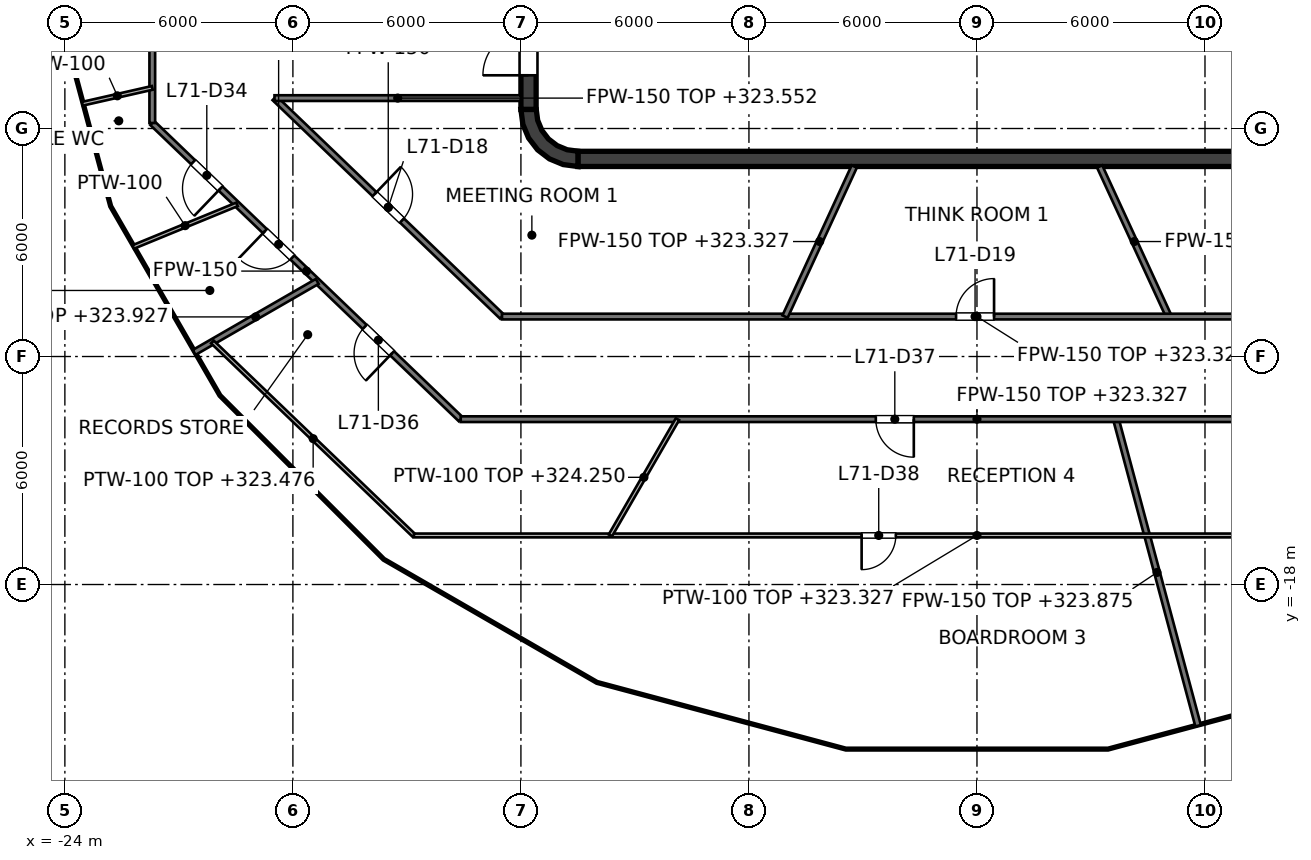
"""IFC4 building model, lengths in metres.
Left out: names, types, materials, properties, quantities, classifications, styles, units other than length and angle.
Written with IfcOpenShell. Run it as: python <this file> out.ifc"""

import sys

from ifc_helpers import new_model, si_unit, direction, frame, frame_2d, origin, place, context, subcontext, project, spatial, polyline, rectangle, outline, extrude, element, fill, save


model = new_model("IFC4")
c1 = context("Model", 3, precision=1e-05, world=origin(), true_north=direction((0.0, 1.0)))
c2 = subcontext(c1, "Body", "Model", "MODEL_VIEW")
j1 = project(units=[si_unit("LENGTHUNIT", "METRE"), si_unit("PLANEANGLEUNIT", "RADIAN")], contexts=[c1])
p1 = place(None, origin())
s1 = spatial("IfcSite", under=j1, at=p1, CompositionType="ELEMENT")
p2 = place(p1, origin())
s2 = spatial("IfcBuilding", under=s1, at=p2, CompositionType="ELEMENT")
p3 = place(p2, frame((0.0, 0.0, 320.4)))
s3 = spatial("IfcBuildingStorey", under=s2, at=p3, CompositionType="ELEMENT", Elevation=320.4)
p4 = place(p3, frame((-10.5, -6.8, 0.0), z_axis=(0.0, 0.0, 1.0), x_axis=(1.0, 0.0, 0.0)))
e1 = element("IfcWall", 1, at=p4, inside=s3, PredefinedType="SHEAR", context=c2, shape_type="SweptSolid", body=[
    extrude(rectangle(XDim=21.0, YDim=0.4, at=frame_2d((10.5, 0.0))), origin(), (0.0, 0.0, 1.0), 4.0),
])
p5 = place(p3, frame((-11.8, -5.5, 0.0), z_axis=(0.0, 0.0, 1.0), x_axis=(0.0, 1.0, 0.0)))
e2 = element("IfcWall", 2, at=p5, inside=s3, PredefinedType="SHEAR", context=c2, shape_type="SweptSolid", body=[
    extrude(rectangle(XDim=11.0, YDim=0.4, at=frame_2d((5.5, 0.0))), origin(), (0.0, 0.0, 1.0), 4.0),
])
p6 = place(p5, frame((3.2, 0.0, 0.0)))
e3 = element("IfcOpeningElement", 3, at=p6, cuts=e2, PredefinedType="OPENING", context=c2, shape_type="SweptSolid", body=[
    extrude(rectangle(XDim=1.0, YDim=2.1, at=frame_2d((0.5, 1.05))), frame((0.0, 0.2, 0.0), z_axis=(0.0, -1.0, 0.0), x_axis=(1.0, 0.0, 0.0)), (0.0, 0.0, 1.0), 0.4),
])
p7 = place(p5, frame((6.1, 0.0, 0.0)))
e4 = element("IfcOpeningElement", 4, at=p7, cuts=e2, PredefinedType="OPENING", context=c2, shape_type="SweptSolid", body=[
    extrude(rectangle(XDim=1.0, YDim=2.1, at=frame_2d((0.5, 1.05))), frame((0.0, 0.2, 0.0), z_axis=(0.0, -1.0, 0.0), x_axis=(1.0, 0.0, 0.0)), (0.0, 0.0, 1.0), 0.4),
])
p8 = place(p5, frame((0.9, 0.0, 0.0)))
e5 = element("IfcOpeningElement", 5, at=p8, cuts=e2, PredefinedType="OPENING", context=c2, shape_type="SweptSolid", body=[
    extrude(rectangle(XDim=1.2, YDim=2.1, at=frame_2d((0.6, 1.05))), frame((0.0, 0.2, 0.0), z_axis=(0.0, -1.0, 0.0), x_axis=(1.0, 0.0, 0.0)), (0.0, 0.0, 1.0), 0.4),
])
p9 = place(p5, frame((8.9, 0.0, 0.0)))
e6 = element("IfcOpeningElement", 6, at=p9, cuts=e2, PredefinedType="OPENING", context=c2, shape_type="SweptSolid", body=[
    extrude(rectangle(XDim=1.2, YDim=2.1, at=frame_2d((0.6, 1.05))), frame((0.0, 0.2, 0.0), z_axis=(0.0, -1.0, 0.0), x_axis=(1.0, 0.0, 0.0)), (0.0, 0.0, 1.0), 0.4),
])
p10 = place(p3, origin())
e7 = element("IfcWall", 7, at=p10, inside=s3, PredefinedType="SHEAR", context=c2, shape_type="SweptSolid", body=[
    extrude(outline(polyline([(-10.5, -7.0), (-10.5, -6.596), (-10.784, -6.559), (-11.048, -6.45), (-11.275, -6.275), (-11.45, -6.048), (-11.559, -5.784), (-11.596, -5.5), (-12.0, -5.5), (-11.949, -5.888), (-11.799, -6.25), (-11.561, -6.561), (-11.25, -6.799), (-10.888, -6.949), (-10.5, -7.0)])), origin(), (0.0, 0.0, 1.0), 4.0),
])
p11 = place(p3, frame((0.3, -6.6, 0.0), z_axis=(0.0, 0.0, 1.0), x_axis=(0.0, 1.0, 0.0)))
e8 = element("IfcWall", 8, at=p11, inside=s3, PredefinedType="PARTITIONING", context=c2, shape_type="SweptSolid", body=[
    extrude(rectangle(XDim=2.5, YDim=0.15, at=frame_2d((1.25, 0.0))), origin(), (0.0, 0.0, 1.0), 3.85),
])
p12 = place(p11, frame((0.8, 0.0, 0.0)))
e9 = element("IfcOpeningElement", 9, at=p12, cuts=e8, PredefinedType="OPENING", context=c2, shape_type="SweptSolid", body=[
    extrude(rectangle(XDim=0.9, YDim=2.1, at=frame_2d((0.45, 1.05))), frame((0.0, 0.075, 0.0), z_axis=(0.0, -1.0, 0.0), x_axis=(1.0, 0.0, 0.0)), (0.0, 0.0, 1.0), 0.15),
])
p13 = place(p3, frame((-9.0, -6.6, 0.0), z_axis=(0.0, 0.0, 1.0), x_axis=(0.0, 1.0, 0.0)))
e10 = element("IfcWall", 10, at=p13, inside=s3, PredefinedType="PARTITIONING", context=c2, shape_type="SweptSolid", body=[
    extrude(rectangle(XDim=2.5, YDim=0.25, at=frame_2d((1.25, 0.0))), origin(), (0.0, 0.0, 1.0), 3.85),
])
p14 = place(p13, frame((0.75, 0.0, 0.0)))
e11 = element("IfcOpeningElement", 11, at=p14, cuts=e10, PredefinedType="OPENING", context=c2, shape_type="SweptSolid", body=[
    extrude(rectangle(XDim=1.0, YDim=2.1, at=frame_2d((0.5, 1.05))), frame((0.0, 0.125, 0.0), z_axis=(0.0, -1.0, 0.0), x_axis=(1.0, 0.0, 0.0)), (0.0, 0.0, 1.0), 0.25),
])
p15 = place(p3, frame((3.15, -6.6, 0.0), z_axis=(0.0, 0.0, 1.0), x_axis=(0.0, 1.0, 0.0)))
e12 = element("IfcWall", 12, at=p15, inside=s3, PredefinedType="SOLIDWALL", context=c2, shape_type="SweptSolid", body=[
    extrude(rectangle(XDim=2.5, YDim=0.25, at=frame_2d((1.25, 0.0))), origin(), (0.0, 0.0, 1.0), 3.85),
])
p16 = place(p3, frame((-2.9, -6.6, 0.0), z_axis=(0.0, 0.0, 1.0), x_axis=(0.0, 1.0, 0.0)))
e13 = element("IfcWall", 13, at=p16, inside=s3, PredefinedType="PARTITIONING", context=c2, shape_type="SweptSolid", body=[
    extrude(rectangle(XDim=2.5, YDim=0.25, at=frame_2d((1.25, 0.0))), origin(), (0.0, 0.0, 1.0), 3.85),
])
p17 = place(p16, frame((0.8, 0.0, 0.0)))
e14 = element("IfcOpeningElement", 14, at=p17, cuts=e13, PredefinedType="OPENING", context=c2, shape_type="SweptSolid", body=[
    extrude(rectangle(XDim=0.9, YDim=2.1, at=frame_2d((0.45, 1.05))), frame((0.0, 0.125, 0.0), z_axis=(0.0, -1.0, 0.0), x_axis=(1.0, 0.0, 0.0)), (0.0, 0.0, 1.0), 0.25),
])
p18 = place(p3, frame((-9.125, -3.975, 0.0), z_axis=(0.0, 0.0, 1.0), x_axis=(1.0, 0.0, 0.0)))
e15 = element("IfcWall", 15, at=p18, inside=s3, PredefinedType="SOLIDWALL", context=c2, shape_type="SweptSolid", body=[
    extrude(rectangle(XDim=12.4, YDim=0.25, at=frame_2d((6.2, 0.0))), origin(), (0.0, 0.0, 1.0), 3.85),
])
p19 = place(p18, frame((1.05, 0.0, 0.0)))
e16 = element("IfcOpeningElement", 16, at=p19, cuts=e15, PredefinedType="OPENING", context=c2, shape_type="SweptSolid", body=[
    extrude(rectangle(XDim=1.2, YDim=2.1, at=frame_2d((0.6, 1.05))), frame((0.0, 0.125, 0.0), z_axis=(0.0, -1.0, 0.0), x_axis=(1.0, 0.0, 0.0)), (0.0, 0.0, 1.0), 0.25),
])
p20 = place(p18, frame((4.1, 0.0, 0.0)))
e17 = element("IfcOpeningElement", 17, at=p20, cuts=e15, PredefinedType="OPENING", context=c2, shape_type="SweptSolid", body=[
    extrude(rectangle(XDim=1.2, YDim=2.1, at=frame_2d((0.6, 1.05))), frame((0.0, 0.125, 0.0), z_axis=(0.0, -1.0, 0.0), x_axis=(1.0, 0.0, 0.0)), (0.0, 0.0, 1.0), 0.25),
])
p21 = place(p3, frame((3.275, -3.975, 0.0), z_axis=(0.0, 0.0, 1.0), x_axis=(1.0, 0.0, 0.0)))
e18 = element("IfcWall", 18, at=p21, inside=s3, PredefinedType="SOLIDWALL", context=c2, shape_type="SweptSolid", body=[
    extrude(rectangle(XDim=5.85, YDim=0.25, at=frame_2d((2.925, 0.0))), origin(), (0.0, 0.0, 1.0), 3.85),
])
p22 = place(p3, frame((3.657, -13.649, 0.0), z_axis=(0.0, 0.0, 1.0), x_axis=(0.258877815031, -0.965910077018, 0.0)))
e19 = element("IfcWall", 19, at=p22, inside=s3, PredefinedType="PARTITIONING", context=c2, shape_type="SweptSolid", body=[
    extrude(rectangle(XDim=8.352, YDim=0.15, at=frame_2d((4.176, 0.0))), origin(), (0.0, 0.0, 1.0), 3.475),
])
p23 = place(p3, frame((3.229, -7.0, 0.0), z_axis=(0.0, 0.0, 1.0), x_axis=(0.418762657012, -0.908095720226, 0.0)))
e20 = element("IfcWall", 20, at=p23, inside=s3, PredefinedType="PARTITIONING", context=c2, shape_type="SweptSolid", body=[
    extrude(rectangle(XDim=4.349, YDim=0.15, at=frame_2d((2.174, 0.0))), origin(), (0.0, 0.0, 1.0), 2.927),
])
p24 = place(p3, frame((-21.7, -5.855, 0.0), z_axis=(0.0, 0.0, 1.0), x_axis=(0.721260272646, -0.692664145963, 0.0)))
e21 = element("IfcWall", 21, at=p24, inside=s3, PredefinedType="PARTITIONING", context=c2, shape_type="SweptSolid", body=[
    extrude(rectangle(XDim=11.252, YDim=0.15, at=frame_2d((5.626, 0.0))), origin(), (0.0, 0.0, 1.0), 3.076),
])
p25 = place(p24, frame((1.489, 0.0, 0.0)))
e22 = element("IfcOpeningElement", 22, at=p25, cuts=e21, PredefinedType="OPENING", context=c2, shape_type="SweptSolid", body=[
    extrude(rectangle(XDim=1.0, YDim=2.1, at=frame_2d((0.5, 1.05))), frame((0.0, 0.075, 0.0), z_axis=(0.0, -1.0, 0.0), x_axis=(1.0, 0.0, 0.0)), (0.0, 0.0, 1.0), 0.15),
])
p26 = place(p24, frame((4.109, 0.0, 0.0)))
e23 = element("IfcOpeningElement", 23, at=p26, cuts=e21, PredefinedType="OPENING", context=c2, shape_type="SweptSolid", body=[
    extrude(rectangle(XDim=1.0, YDim=2.1, at=frame_2d((0.5, 1.05))), frame((0.0, 0.075, 0.0), z_axis=(0.0, -1.0, 0.0), x_axis=(1.0, 0.0, 0.0)), (0.0, 0.0, 1.0), 0.15),
])
p27 = place(p24, frame((7.748, 0.0, 0.0)))
e24 = element("IfcOpeningElement", 24, at=p27, cuts=e21, PredefinedType="OPENING", context=c2, shape_type="SweptSolid", body=[
    extrude(rectangle(XDim=1.0, YDim=2.1, at=frame_2d((0.5, 1.05))), frame((0.0, 0.075, 0.0), z_axis=(0.0, -1.0, 0.0), x_axis=(1.0, 0.0, 0.0)), (0.0, 0.0, 1.0), 0.15),
])
p28 = place(p3, frame((-18.484, -5.2, 0.0), z_axis=(0.0, 0.0, 1.0), x_axis=(0.721258572397, -0.692665916401, 0.0)))
e25 = element("IfcWall", 25, at=p28, inside=s3, PredefinedType="PARTITIONING", context=c2, shape_type="SweptSolid", body=[
    extrude(rectangle(XDim=8.3, YDim=0.15, at=frame_2d((4.15, 0.0))), origin(), (0.0, 0.0, 1.0), 3.076),
])
p29 = place(p28, frame((3.65, 0.0, 0.0)))
e26 = element("IfcOpeningElement", 26, at=p29, cuts=e25, PredefinedType="OPENING", context=c2, shape_type="SweptSolid", body=[
    extrude(rectangle(XDim=1.0, YDim=2.1, at=frame_2d((0.5, 1.05))), frame((0.0, 0.075, 0.0), z_axis=(0.0, -1.0, 0.0), x_axis=(1.0, 0.0, 0.0)), (0.0, 0.0, 1.0), 0.15),
])
p30 = place(p3, frame((-13.584, -13.649, 0.0), z_axis=(0.0, 0.0, 1.0), x_axis=(1.0, 0.0, 0.0)))
e27 = element("IfcWall", 27, at=p30, inside=s3, PredefinedType="PARTITIONING", context=c2, shape_type="SweptSolid", body=[
    extrude(rectangle(XDim=27.168, YDim=0.15, at=frame_2d((13.584, 0.0))), origin(), (0.0, 0.0, 1.0), 2.927),
])
p31 = place(p30, frame((10.922, 0.0, 0.0)))
e28 = element("IfcOpeningElement", 28, at=p31, cuts=e27, PredefinedType="OPENING", context=c2, shape_type="SweptSolid", body=[
    extrude(rectangle(XDim=1.0, YDim=2.1, at=frame_2d((0.5, 1.05))), frame((0.0, 0.075, 0.0), z_axis=(0.0, -1.0, 0.0), x_axis=(1.0, 0.0, 0.0)), (0.0, 0.0, 1.0), 0.15),
])
p32 = place(p30, frame((21.654, 0.0, 0.0)))
e29 = element("IfcOpeningElement", 29, at=p32, cuts=e27, PredefinedType="OPENING", context=c2, shape_type="SweptSolid", body=[
    extrude(rectangle(XDim=1.0, YDim=2.1, at=frame_2d((0.5, 1.05))), frame((0.0, 0.075, 0.0), z_axis=(0.0, -1.0, 0.0), x_axis=(1.0, 0.0, 0.0)), (0.0, 0.0, 1.0), 0.15),
])
p33 = place(p3, frame((-12.498, -10.949, 0.0), z_axis=(0.0, 0.0, 1.0), x_axis=(1.0, 0.0, 0.0)))
e30 = element("IfcWall", 30, at=p33, inside=s3, PredefinedType="PARTITIONING", context=c2, shape_type="SweptSolid", body=[
    extrude(rectangle(XDim=24.996, YDim=0.15, at=frame_2d((12.498, 0.0))), origin(), (0.0, 0.0, 1.0), 2.927),
])
p34 = place(p33, frame((11.948, 0.0, 0.0)))
e31 = element("IfcOpeningElement", 31, at=p34, cuts=e30, PredefinedType="OPENING", context=c2, shape_type="SweptSolid", body=[
    extrude(rectangle(XDim=1.0, YDim=2.1, at=frame_2d((0.5, 1.05))), frame((0.0, 0.075, 0.0), z_axis=(0.0, -1.0, 0.0), x_axis=(1.0, 0.0, 0.0)), (0.0, 0.0, 1.0), 0.15),
])
p35 = place(p3, frame((-18.484, -5.2, 0.0), z_axis=(0.0, 0.0, 1.0), x_axis=(1.0, 0.0, 0.0)))
e32 = element("IfcWall", 32, at=p35, inside=s3, PredefinedType="PARTITIONING", context=c2, shape_type="SweptSolid", body=[
    extrude(rectangle(XDim=6.484, YDim=0.15, at=frame_2d((3.242, 0.0))), origin(), (0.0, 0.0, 1.0), 3.152),
])
p36 = place(p3, frame((-20.598, -11.892, 0.0), z_axis=(0.0, 0.0, 1.0), x_axis=(0.866210589025, 0.499679112493, 0.0)))
e33 = element("IfcWall", 33, at=p36, inside=s3, PredefinedType="PARTITIONING", context=c2, shape_type="SweptSolid", body=[
    extrude(rectangle(XDim=3.739, YDim=0.15, at=frame_2d((1.869, 0.0))), origin(), (0.0, 0.0, 1.0), 3.527),
])
p37 = place(p3, frame((-5.05, -10.949, 0.0), z_axis=(0.0, 0.0, 1.0), x_axis=(0.418762657012, 0.908095720226, 0.0)))
e34 = element("IfcWall", 34, at=p37, inside=s3, PredefinedType="PARTITIONING", context=c2, shape_type="SweptSolid", body=[
    extrude(rectangle(XDim=4.349, YDim=0.15, at=frame_2d((2.174, 0.0))), origin(), (0.0, 0.0, 1.0), 2.927),
])
p38 = place(p3, frame((-21.7, -5.855, 0.0), z_axis=(0.0, 0.0, 1.0), x_axis=(0.0, 1.0, 0.0)))
e35 = element("IfcWall", 35, at=p38, inside=s3, PredefinedType="PARTITIONING", context=c2, shape_type="SweptSolid", body=[
    extrude(rectangle(XDim=11.71, YDim=0.15, at=frame_2d((5.855, 0.0))), origin(), (0.0, 0.0, 1.0), 3.076),
])
p39 = place(p38, frame((5.362, 0.0, 0.0)))
e36 = element("IfcOpeningElement", 36, at=p39, cuts=e35, PredefinedType="OPENING", context=c2, shape_type="SweptSolid", body=[
    extrude(rectangle(XDim=1.0, YDim=2.1, at=frame_2d((0.5, 1.05))), frame((0.0, 0.075, 0.0), z_axis=(0.0, -1.0, 0.0), x_axis=(1.0, 0.0, 0.0)), (0.0, 0.0, 1.0), 0.15),
])
p40 = place(p3, frame((-20.119, -11.616, 0.0), z_axis=(0.0, 0.0, 1.0), x_axis=(0.721304381014, -0.692618213686, 0.0)))
e37 = element("IfcWall", 37, at=p40, inside=s3, PredefinedType="PARTITIONING", context=c2, shape_type="SweptSolid", body=[
    extrude(rectangle(XDim=7.353, YDim=0.1, at=frame_2d((3.677, 0.0))), origin(), (0.0, 0.0, 1.0), 3.076),
])
p41 = place(p3, frame((-14.815, -16.709, 0.0), z_axis=(0.0, 0.0, 1.0), x_axis=(1.0, 0.0, 0.0)))
e38 = element("IfcWall", 38, at=p41, inside=s3, PredefinedType="PARTITIONING", context=c2, shape_type="SweptSolid", body=[
    extrude(rectangle(XDim=29.63, YDim=0.1, at=frame_2d((14.815, 0.0))), origin(), (0.0, 0.0, 1.0), 2.927),
])
p42 = place(p41, frame((11.78, 0.0, 0.0)))
e39 = element("IfcOpeningElement", 39, at=p42, cuts=e38, PredefinedType="OPENING", context=c2, shape_type="SweptSolid", body=[
    extrude(rectangle(XDim=0.9, YDim=2.1, at=frame_2d((0.45, 1.05))), frame((0.0, 0.05, 0.0), z_axis=(0.0, -1.0, 0.0), x_axis=(1.0, 0.0, 0.0)), (0.0, 0.0, 1.0), 0.1),
])
p43 = place(p41, frame((23.408, 0.0, 0.0)))
e40 = element("IfcOpeningElement", 40, at=p43, cuts=e38, PredefinedType="OPENING", context=c2, shape_type="SweptSolid", body=[
    extrude(rectangle(XDim=0.9, YDim=2.1, at=frame_2d((0.45, 1.05))), frame((0.0, 0.05, 0.0), z_axis=(0.0, -1.0, 0.0), x_axis=(1.0, 0.0, 0.0)), (0.0, 0.0, 1.0), 0.1),
])
p44 = place(p3, frame((-23.539, -5.349, 0.0), z_axis=(0.0, 0.0, 1.0), x_axis=(0.975106145997, 0.221738593932, 0.0)))
e41 = element("IfcWall", 41, at=p44, inside=s3, PredefinedType="PARTITIONING", context=c2, shape_type="SweptSolid", body=[
    extrude(rectangle(XDim=1.886, YDim=0.1, at=frame_2d((0.943, 0.0))), origin(), (0.0, 0.0, 1.0), 3.527),
])
p45 = place(p3, frame((-22.2, -9.117, 0.0), z_axis=(0.0, 0.0, 1.0), x_axis=(0.925066536441, 0.379805085745, 0.0)))
e42 = element("IfcWall", 42, at=p45, inside=s3, PredefinedType="PARTITIONING", context=c2, shape_type="SweptSolid", body=[
    extrude(rectangle(XDim=2.951, YDim=0.1, at=frame_2d((1.476, 0.0))), origin(), (0.0, 0.0, 1.0), 3.527),
])
p46 = place(p3, frame((-9.647, -16.709, 0.0), z_axis=(0.0, 0.0, 1.0), x_axis=(0.500077296118, 0.86598077225, 0.0)))
e43 = element("IfcWall", 43, at=p46, inside=s3, PredefinedType="PARTITIONING", context=c2, shape_type="SweptSolid", body=[
    extrude(rectangle(XDim=3.534, YDim=0.1, at=frame_2d((1.767, 0.0))), origin(), (0.0, 0.0, 1.0), 3.85),
])
p47 = place(p19, origin())
e44 = element("IfcDoor", 44, at=p47, inside=s3, OperationType="DOUBLE_DOOR_SLIDING", PredefinedType="DOOR", context=c2, shape_type="SweptSolid", body=[
    extrude(rectangle(XDim=1.2, YDim=2.1, at=frame_2d((0.6, 1.05))), frame((0.0, 0.025, 0.0), z_axis=(0.0, -1.0, 0.0), x_axis=(1.0, 0.0, 0.0)), (0.0, 0.0, 1.0), 0.05),
])
fill(e16, e44)
p48 = place(p20, origin())
e45 = element("IfcDoor", 45, at=p48, inside=s3, OperationType="DOUBLE_DOOR_SLIDING", PredefinedType="DOOR", context=c2, shape_type="SweptSolid", body=[
    extrude(rectangle(XDim=1.2, YDim=2.1, at=frame_2d((0.6, 1.05))), frame((0.0, 0.025, 0.0), z_axis=(0.0, -1.0, 0.0), x_axis=(1.0, 0.0, 0.0)), (0.0, 0.0, 1.0), 0.05),
])
fill(e17, e45)
p49 = place(p14, origin())
e46 = element("IfcDoor", 46, at=p49, inside=s3, OperationType="SINGLE_SWING_LEFT", PredefinedType="DOOR", context=c2, shape_type="SweptSolid", body=[
    extrude(rectangle(XDim=1.0, YDim=2.1, at=frame_2d((0.5, 1.05))), frame((0.0, 0.025, 0.0), z_axis=(0.0, -1.0, 0.0), x_axis=(1.0, 0.0, 0.0)), (0.0, 0.0, 1.0), 0.05),
])
fill(e11, e46)
p50 = place(p17, origin())
e47 = element("IfcDoor", 47, at=p50, inside=s3, OperationType="SINGLE_SWING_RIGHT", PredefinedType="DOOR", context=c2, shape_type="SweptSolid", body=[
    extrude(rectangle(XDim=0.9, YDim=2.1, at=frame_2d((0.45, 1.05))), frame((0.0, 0.025, 0.0), z_axis=(0.0, -1.0, 0.0), x_axis=(1.0, 0.0, 0.0)), (0.0, 0.0, 1.0), 0.05),
])
fill(e14, e47)
p51 = place(p12, origin())
e48 = element("IfcDoor", 48, at=p51, inside=s3, OperationType="SINGLE_SWING_RIGHT", PredefinedType="DOOR", context=c2, shape_type="SweptSolid", body=[
    extrude(rectangle(XDim=0.9, YDim=2.1, at=frame_2d((0.45, 1.05))), frame((0.0, 0.025, 0.0), z_axis=(0.0, -1.0, 0.0), x_axis=(1.0, 0.0, 0.0)), (0.0, 0.0, 1.0), 0.05),
])
fill(e9, e48)
p52 = place(p8, origin())
e49 = element("IfcDoor", 49, at=p52, inside=s3, OperationType="SINGLE_SWING_LEFT", PredefinedType="DOOR", context=c2, shape_type="SweptSolid", body=[
    extrude(rectangle(XDim=1.2, YDim=2.1, at=frame_2d((0.6, 1.05))), frame((0.0, 0.025, 0.0), z_axis=(0.0, -1.0, 0.0), x_axis=(1.0, 0.0, 0.0)), (0.0, 0.0, 1.0), 0.05),
])
fill(e5, e49)
p53 = place(p29, origin())
e50 = element("IfcDoor", 50, at=p53, inside=s3, OperationType="SINGLE_SWING_LEFT", PredefinedType="DOOR", context=c2, shape_type="SweptSolid", body=[
    extrude(rectangle(XDim=1.0, YDim=2.1, at=frame_2d((0.5, 1.05))), frame((0.0, 0.025, 0.0), z_axis=(0.0, -1.0, 0.0), x_axis=(1.0, 0.0, 0.0)), (0.0, 0.0, 1.0), 0.05),
])
fill(e26, e50)
p54 = place(p34, origin())
e51 = element("IfcDoor", 51, at=p54, inside=s3, OperationType="SINGLE_SWING_RIGHT", PredefinedType="DOOR", context=c2, shape_type="SweptSolid", body=[
    extrude(rectangle(XDim=1.0, YDim=2.1, at=frame_2d((0.5, 1.05))), frame((0.0, 0.025, 0.0), z_axis=(0.0, -1.0, 0.0), x_axis=(1.0, 0.0, 0.0)), (0.0, 0.0, 1.0), 0.05),
])
fill(e31, e51)
p55 = place(p25, origin())
e52 = element("IfcDoor", 52, at=p55, inside=s3, OperationType="SINGLE_SWING_RIGHT", PredefinedType="DOOR", context=c2, shape_type="SweptSolid", body=[
    extrude(rectangle(XDim=1.0, YDim=2.1, at=frame_2d((0.5, 1.05))), frame((0.0, 0.025, 0.0), z_axis=(0.0, -1.0, 0.0), x_axis=(1.0, 0.0, 0.0)), (0.0, 0.0, 1.0), 0.05),
])
fill(e22, e52)
p56 = place(p26, origin())
e53 = element("IfcDoor", 53, at=p56, inside=s3, OperationType="SINGLE_SWING_LEFT", PredefinedType="DOOR", context=c2, shape_type="SweptSolid", body=[
    extrude(rectangle(XDim=1.0, YDim=2.1, at=frame_2d((0.5, 1.05))), frame((0.0, 0.025, 0.0), z_axis=(0.0, -1.0, 0.0), x_axis=(1.0, 0.0, 0.0)), (0.0, 0.0, 1.0), 0.05),
])
fill(e23, e53)
p57 = place(p27, origin())
e54 = element("IfcDoor", 54, at=p57, inside=s3, OperationType="SINGLE_SWING_RIGHT", PredefinedType="DOOR", context=c2, shape_type="SweptSolid", body=[
    extrude(rectangle(XDim=1.0, YDim=2.1, at=frame_2d((0.5, 1.05))), frame((0.0, 0.025, 0.0), z_axis=(0.0, -1.0, 0.0), x_axis=(1.0, 0.0, 0.0)), (0.0, 0.0, 1.0), 0.05),
])
fill(e24, e54)
p58 = place(p31, origin())
e55 = element("IfcDoor", 55, at=p58, inside=s3, OperationType="SINGLE_SWING_RIGHT", PredefinedType="DOOR", context=c2, shape_type="SweptSolid", body=[
    extrude(rectangle(XDim=1.0, YDim=2.1, at=frame_2d((0.5, 1.05))), frame((0.0, 0.025, 0.0), z_axis=(0.0, -1.0, 0.0), x_axis=(1.0, 0.0, 0.0)), (0.0, 0.0, 1.0), 0.05),
])
fill(e28, e55)
p59 = place(p42, origin())
e56 = element("IfcDoor", 56, at=p59, inside=s3, OperationType="SINGLE_SWING_LEFT", PredefinedType="DOOR", context=c2, shape_type="SweptSolid", body=[
    extrude(rectangle(XDim=0.9, YDim=2.1, at=frame_2d((0.45, 1.05))), frame((0.0, 0.025, 0.0), z_axis=(0.0, -1.0, 0.0), x_axis=(1.0, 0.0, 0.0)), (0.0, 0.0, 1.0), 0.05),
])
fill(e39, e56)
save(model, sys.argv[1])
